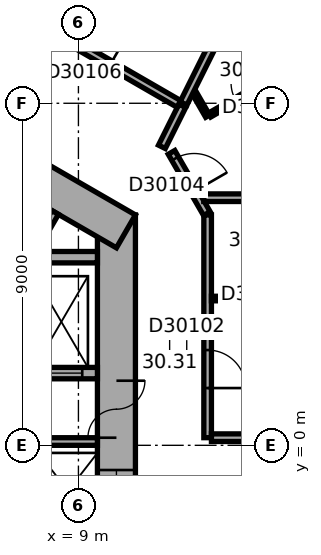
"""IFC4 building model, lengths in metres.
Left out: names, types, materials, properties, quantities, classifications, styles, units other than length and angle.
Written with IfcOpenShell. Run it as: python <this file> out.ifc"""

import sys

from ifc_helpers import new_model, si_unit, direction, frame, frame_2d, origin, place, context, subcontext, project, spatial, rectangle, extrude, element, fill, save


model = new_model("IFC4")
c1 = context("Model", 3, precision=1e-05, world=origin(), true_north=direction((0.0, 1.0)))
c2 = subcontext(c1, "Body", "Model", "MODEL_VIEW")
j1 = project(units=[si_unit("LENGTHUNIT", "METRE"), si_unit("PLANEANGLEUNIT", "RADIAN")], contexts=[c1])
p1 = place(None, origin())
s1 = spatial("IfcSite", under=j1, at=p1, CompositionType="ELEMENT")
p2 = place(p1, origin())
s2 = spatial("IfcBuilding", under=s1, at=p2, CompositionType="ELEMENT")
p3 = place(p2, frame((0.0, 0.0, 124.4)))
s3 = spatial("IfcBuildingStorey", under=s2, at=p3, CompositionType="ELEMENT", Elevation=124.4)
p4 = place(p3, frame((10.0, -6.062, 0.0), z_axis=(0.0, 0.0, 1.0), x_axis=(0.0, 1.0, 0.0)))
e1 = element("IfcWall", 1, at=p4, inside=s3, PredefinedType="SHEAR", context=c2, shape_type="SweptSolid", body=[
    extrude(rectangle(XDim=12.125, YDim=1.0, at=frame_2d((6.062, 0.0))), origin(), (0.0, 0.0, 1.0), 3.7),
])
p5 = place(p4, frame((6.262, 0.0, 0.0)))
e2 = element("IfcOpeningElement", 2, at=p5, cuts=e1, PredefinedType="OPENING", context=c2, shape_type="SweptSolid", body=[
    extrude(rectangle(XDim=1.5, YDim=2.1, at=frame_2d((0.75, 1.05))), frame((0.0, 0.51, 0.0), z_axis=(0.0, -1.0, 0.0), x_axis=(1.0, 0.0, 0.0)), (0.0, 0.0, 1.0), 1.02),
])
p6 = place(p4, frame((1.712, 0.0, 0.0)))
e3 = element("IfcOpeningElement", 3, at=p6, cuts=e1, PredefinedType="OPENING", context=c2, shape_type="SweptSolid", body=[
    extrude(rectangle(XDim=1.1, YDim=2.1, at=frame_2d((0.55, 1.05))), frame((0.0, 0.51, 0.0), z_axis=(0.0, -1.0, 0.0), x_axis=(1.0, 0.0, 0.0)), (0.0, 0.0, 1.0), 1.02),
])
p7 = place(p4, frame((4.312, 0.0, 0.0)))
e4 = element("IfcOpeningElement", 4, at=p7, cuts=e1, PredefinedType="OPENING", context=c2, shape_type="SweptSolid", body=[
    extrude(rectangle(XDim=1.1, YDim=2.1, at=frame_2d((0.55, 1.05))), frame((0.0, 0.51, 0.0), z_axis=(0.0, -1.0, 0.0), x_axis=(1.0, 0.0, 0.0)), (0.0, 0.0, 1.0), 1.02),
])
p8 = place(p3, frame((10.25, 5.629, 0.0), z_axis=(0.0, 0.0, 1.0), x_axis=(-0.866022616891, 0.50000482701, 0.0)))
e5 = element("IfcWall", 5, at=p8, inside=s3, PredefinedType="SHEAR", context=c2, shape_type="SweptSolid", body=[
    extrude(rectangle(XDim=12.125, YDim=1.0, at=frame_2d((6.062, 0.0))), origin(), (0.0, 0.0, 1.0), 3.7),
])
p9 = place(p8, frame((2.612, 0.0, 0.0)))
e6 = element("IfcOpeningElement", 6, at=p9, cuts=e5, PredefinedType="OPENING", context=c2, shape_type="SweptSolid", body=[
    extrude(rectangle(XDim=1.1, YDim=2.1, at=frame_2d((0.55, 1.05))), frame((0.0, 0.51, 0.0), z_axis=(0.0, -1.0, 0.0), x_axis=(1.0, 0.0, 0.0)), (0.0, 0.0, 1.0), 1.02),
])
p10 = place(p8, frame((5.212, 0.0, 0.0)))
e7 = element("IfcOpeningElement", 7, at=p10, cuts=e5, PredefinedType="OPENING", context=c2, shape_type="SweptSolid", body=[
    extrude(rectangle(XDim=1.1, YDim=2.1, at=frame_2d((0.55, 1.05))), frame((0.0, 0.51, 0.0), z_axis=(0.0, -1.0, 0.0), x_axis=(1.0, 0.0, 0.0)), (0.0, 0.0, 1.0), 1.02),
])
p11 = place(p8, frame((7.812, 0.0, 0.0)))
e8 = element("IfcOpeningElement", 8, at=p11, cuts=e5, PredefinedType="OPENING", context=c2, shape_type="SweptSolid", body=[
    extrude(rectangle(XDim=1.1, YDim=2.1, at=frame_2d((0.55, 1.05))), frame((0.0, 0.51, 0.0), z_axis=(0.0, -1.0, 0.0), x_axis=(1.0, 0.0, 0.0)), (0.0, 0.0, 1.0), 1.02),
])
for number, where, z_axis, x_axis in (
    (9, (7.3, 0.1, 0.0), (0.0, 0.0, 1.0), (1.0, 0.0, 0.0)),
    (10, (7.287, 4.222, 0.0), (0.0, 0.0, 1.0), (0.5, 0.866, 0.0)),
):
    element("IfcWall", number, at=place(p3, frame(where, z_axis=z_axis, x_axis=x_axis)), inside=s3, PredefinedType="PARTITIONING", context=c2, shape_type="SweptSolid", body=[
        extrude(rectangle(XDim=2.2, YDim=0.2, at=frame_2d((1.1, 0.0))), origin(), (0.0, 0.0, 1.0), 3.42),
    ])
p12 = place(p3, frame((7.3, 1.9, 0.0), z_axis=(0.0, 0.0, 1.0), x_axis=(1.0, 0.0, 0.0)))
e11 = element("IfcWall", 11, at=p12, inside=s3, PredefinedType="SHEAR", context=c2, shape_type="SweptSolid", body=[
    extrude(rectangle(XDim=2.2, YDim=0.3, at=frame_2d((1.1, 0.0))), origin(), (0.0, 0.0, 1.0), 3.42),
])
p13 = place(p12, frame((0.7, 0.0, 0.0)))
e12 = element("IfcOpeningElement", 12, at=p13, cuts=e11, PredefinedType="OPENING", context=c2, shape_type="SweptSolid", body=[
    extrude(rectangle(XDim=1.1, YDim=2.1, at=frame_2d((0.55, 1.05))), frame((0.0, 0.16, 0.0), z_axis=(0.0, -1.0, 0.0), x_axis=(1.0, 0.0, 0.0)), (0.0, 0.0, 1.0), 0.32),
])
p14 = place(p3, frame((7.3, 4.95, 0.0), z_axis=(0.0, 0.0, 1.0), x_axis=(1.0, 0.0, 0.0)))
e13 = element("IfcWall", 13, at=p14, inside=s3, PredefinedType="SHEAR", context=c2, shape_type="SweptSolid", body=[
    extrude(rectangle(XDim=2.2, YDim=0.3, at=frame_2d((1.1, 0.0))), origin(), (0.0, 0.0, 1.0), 3.42),
])
p15 = place(p3, frame((11.196, 7.854, 0.0), z_axis=(0.0, 0.0, 1.0), x_axis=(0.446241040303, 0.894912808015, 0.0)))
e14 = element("IfcWall", 14, at=p15, inside=s3, PredefinedType="PARTITIONING", context=c2, shape_type="SweptSolid", body=[
    extrude(rectangle(XDim=1.205, YDim=0.2, at=frame_2d((0.603, 0.0))), origin(), (0.0, 0.0, 1.0), 3.42),
])
p16 = place(p3, frame((11.646, 8.981, 0.0), z_axis=(0.0, 0.0, 1.0), x_axis=(-0.866027142779, 0.499996987961, 0.0)))
e15 = element("IfcWall", 15, at=p16, inside=s3, PredefinedType="PARTITIONING", context=c2, shape_type="SweptSolid", body=[
    extrude(rectangle(XDim=9.597, YDim=0.2, at=frame_2d((4.798, 0.0))), origin(), (0.0, 0.0, 1.0), 3.42),
])
p17 = place(p16, frame((2.086, 0.0, 0.0)))
e16 = element("IfcOpeningElement", 16, at=p17, cuts=e15, PredefinedType="OPENING", context=c2, shape_type="SweptSolid", body=[
    extrude(rectangle(XDim=1.0, YDim=2.1, at=frame_2d((0.5, 1.05))), frame((0.0, 0.11, 0.0), z_axis=(0.0, -1.0, 0.0), x_axis=(1.0, 0.0, 0.0)), (0.0, 0.0, 1.0), 0.22),
])
p18 = place(p16, frame((8.01, 0.0, 0.0)))
e17 = element("IfcOpeningElement", 17, at=p18, cuts=e15, PredefinedType="OPENING", context=c2, shape_type="SweptSolid", body=[
    extrude(rectangle(XDim=1.0, YDim=2.1, at=frame_2d((0.5, 1.05))), frame((0.0, 0.11, 0.0), z_axis=(0.0, -1.0, 0.0), x_axis=(1.0, 0.0, 0.0)), (0.0, 0.0, 1.0), 0.22),
])
p19 = place(p3, frame((12.38, 6.097, 0.0), z_axis=(0.0, 0.0, 1.0), x_axis=(-0.499964847546, 0.866045698112, 0.0)))
e18 = element("IfcWall", 18, at=p19, inside=s3, PredefinedType="PARTITIONING", context=c2, shape_type="SweptSolid", body=[
    extrude(rectangle(XDim=1.86, YDim=0.2, at=frame_2d((0.93, 0.0))), origin(), (0.0, 0.0, 1.0), 3.42),
])
p20 = place(p19, frame((0.672, 0.0, 0.0)))
e19 = element("IfcOpeningElement", 19, at=p20, cuts=e18, PredefinedType="OPENING", context=c2, shape_type="SweptSolid", body=[
    extrude(rectangle(XDim=1.0, YDim=2.1, at=frame_2d((0.5, 1.05))), frame((0.0, 0.11, 0.0), z_axis=(0.0, -1.0, 0.0), x_axis=(1.0, 0.0, 0.0)), (0.0, 0.0, 1.0), 0.22),
])
p21 = place(p3, frame((12.4, 0.201, 0.0), z_axis=(0.0, 0.0, 1.0), x_axis=(0.0, 1.0, 0.0)))
e20 = element("IfcWall", 20, at=p21, inside=s3, PredefinedType="PARTITIONING", context=c2, shape_type="SweptSolid", body=[
    extrude(rectangle(XDim=5.861, YDim=0.2, at=frame_2d((2.931, 0.0))), origin(), (0.0, 0.0, 1.0), 3.42),
])
p22 = place(p21, frame((1.306, 0.0, 0.0)))
e21 = element("IfcOpeningElement", 21, at=p22, cuts=e20, PredefinedType="OPENING", context=c2, shape_type="SweptSolid", body=[
    extrude(rectangle(XDim=1.0, YDim=2.1, at=frame_2d((0.5, 1.05))), frame((0.0, 0.11, 0.0), z_axis=(0.0, -1.0, 0.0), x_axis=(1.0, 0.0, 0.0)), (0.0, 0.0, 1.0), 0.22),
])
p23 = place(p3, frame((12.401, 8.661, 0.0), z_axis=(0.0, 0.0, 1.0), x_axis=(-0.499831418649, 0.866122712398, 0.0)))
e22 = element("IfcWall", 22, at=p23, inside=s3, PredefinedType="PARTITIONING", context=c2, shape_type="SweptSolid", body=[
    extrude(rectangle(XDim=0.711, YDim=0.12, at=frame_2d((0.355, 0.0))), origin(), (0.0, 0.0, 1.0), 3.42),
])
p24 = place(p3, frame((13.501, 0.201, 0.0), z_axis=(0.0, 0.0, 1.0), x_axis=(-1.0, 0.0, 0.0)))
e23 = element("IfcWall", 23, at=p24, inside=s3, PredefinedType="PARTITIONING", context=c2, shape_type="SweptSolid", body=[
    extrude(rectangle(XDim=1.001, YDim=0.2, at=frame_2d((0.5, 0.0))), origin(), (0.0, 0.0, 1.0), 3.42),
])
p25 = place(p3, frame((14.601, 9.931, 0.0), z_axis=(0.0, 0.0, 1.0), x_axis=(-0.866023285932, -0.50000366821, 0.0)))
e24 = element("IfcWall", 24, at=p25, inside=s3, PredefinedType="PARTITIONING", context=c2, shape_type="SweptSolid", body=[
    extrude(rectangle(XDim=2.48, YDim=0.12, at=frame_2d((1.24, 0.0))), origin(), (0.0, 0.0, 1.0), 3.42),
])
p26 = place(p25, frame((0.79, 0.0, 0.0)))
e25 = element("IfcOpeningElement", 25, at=p26, cuts=e24, PredefinedType="OPENING", context=c2, shape_type="SweptSolid", body=[
    extrude(rectangle(XDim=0.9, YDim=2.1, at=frame_2d((0.45, 1.05))), frame((0.0, 0.07, 0.0), z_axis=(0.0, -1.0, 0.0), x_axis=(1.0, 0.0, 0.0)), (0.0, 0.0, 1.0), 0.14),
])
p27 = place(p3, frame((15.0, 3.862, 0.0), z_axis=(0.0, 0.0, 1.0), x_axis=(-1.0, 0.0, 0.0)))
e26 = element("IfcWall", 26, at=p27, inside=s3, PredefinedType="PARTITIONING", context=c2, shape_type="SweptSolid", body=[
    extrude(rectangle(XDim=2.5, YDim=0.12, at=frame_2d((1.25, 0.0))), origin(), (0.0, 0.0, 1.0), 3.42),
])
p28 = place(p27, frame((0.8, 0.0, 0.0)))
e27 = element("IfcOpeningElement", 27, at=p28, cuts=e26, PredefinedType="OPENING", context=c2, shape_type="SweptSolid", body=[
    extrude(rectangle(XDim=0.9, YDim=2.1, at=frame_2d((0.45, 1.05))), frame((0.0, 0.07, 0.0), z_axis=(0.0, -1.0, 0.0), x_axis=(1.0, 0.0, 0.0)), (0.0, 0.0, 1.0), 0.14),
])
p29 = place(p3, frame((15.09, 15.663, 0.0), z_axis=(0.0, 0.0, 1.0), x_axis=(-0.446203977428, -0.89493128816, 0.0)))
e28 = element("IfcWall", 28, at=p29, inside=s3, PredefinedType="PARTITIONING", context=c2, shape_type="SweptSolid", body=[
    extrude(rectangle(XDim=7.45, YDim=0.2, at=frame_2d((3.725, 0.0))), origin(), (0.0, 0.0, 1.0), 3.42),
])
p30 = place(p3, frame((20.75, 6.515, 0.0), z_axis=(0.0, 0.0, 1.0), x_axis=(-1.0, 0.0, 0.0)))
e29 = element("IfcWall", 29, at=p30, inside=s3, PredefinedType="PARTITIONING", context=c2, shape_type="SweptSolid", body=[
    extrude(rectangle(XDim=8.452, YDim=0.2, at=frame_2d((4.226, 0.0))), origin(), (0.0, 0.0, 1.0), 3.42),
])
p31 = place(p5, origin())
e30 = element("IfcDoor", 30, at=p31, inside=s3, OperationType="DOUBLE_DOOR_SINGLE_SWING", PredefinedType="DOOR", context=c2, shape_type="SweptSolid", body=[
    extrude(rectangle(XDim=1.5, YDim=2.1, at=frame_2d((0.75, 1.05))), frame((0.0, 0.025, 0.0), z_axis=(0.0, -1.0, 0.0), x_axis=(1.0, 0.0, 0.0)), (0.0, 0.0, 1.0), 0.05),
])
fill(e2, e30)
p32 = place(p13, origin())
e31 = element("IfcDoor", 31, at=p32, inside=s3, OperationType="DOUBLE_DOOR_SLIDING", PredefinedType="DOOR", context=c2, shape_type="SweptSolid", body=[
    extrude(rectangle(XDim=1.1, YDim=2.1, at=frame_2d((0.55, 1.05))), frame((0.0, 0.025, 0.0), z_axis=(0.0, -1.0, 0.0), x_axis=(1.0, 0.0, 0.0)), (0.0, 0.0, 1.0), 0.05),
])
fill(e12, e31)
p33 = place(p7, origin())
e32 = element("IfcDoor", 32, at=p33, inside=s3, OperationType="DOUBLE_DOOR_SLIDING", PredefinedType="DOOR", context=c2, shape_type="SweptSolid", body=[
    extrude(rectangle(XDim=1.1, YDim=2.1, at=frame_2d((0.55, 1.05))), frame((0.0, 0.025, 0.0), z_axis=(0.0, -1.0, 0.0), x_axis=(1.0, 0.0, 0.0)), (0.0, 0.0, 1.0), 0.05),
])
fill(e4, e32)
p34 = place(p22, origin())
e33 = element("IfcDoor", 33, at=p34, inside=s3, OperationType="SINGLE_SWING_LEFT", PredefinedType="DOOR", context=c2, shape_type="SweptSolid", body=[
    extrude(rectangle(XDim=1.0, YDim=2.1, at=frame_2d((0.5, 1.05))), frame((0.0, 0.025, 0.0), z_axis=(0.0, -1.0, 0.0), x_axis=(1.0, 0.0, 0.0)), (0.0, 0.0, 1.0), 0.05),
])
fill(e21, e33)
p35 = place(p20, origin())
e34 = element("IfcDoor", 34, at=p35, inside=s3, OperationType="SINGLE_SWING_LEFT", PredefinedType="DOOR", context=c2, shape_type="SweptSolid", body=[
    extrude(rectangle(XDim=1.0, YDim=2.1, at=frame_2d((0.5, 1.05))), frame((0.0, 0.025, 0.0), z_axis=(0.0, -1.0, 0.0), x_axis=(1.0, 0.0, 0.0)), (0.0, 0.0, 1.0), 0.05),
])
fill(e19, e34)
p36 = place(p26, origin())
e35 = element("IfcDoor", 35, at=p36, inside=s3, OperationType="SINGLE_SWING_LEFT", PredefinedType="DOOR", context=c2, shape_type="SweptSolid", body=[
    extrude(rectangle(XDim=0.9, YDim=2.1, at=frame_2d((0.45, 1.05))), frame((0.0, 0.025, 0.0), z_axis=(0.0, -1.0, 0.0), x_axis=(1.0, 0.0, 0.0)), (0.0, 0.0, 1.0), 0.05),
])
fill(e25, e35)
p37 = place(p17, origin())
e36 = element("IfcDoor", 36, at=p37, inside=s3, OperationType="SINGLE_SWING_LEFT", PredefinedType="DOOR", context=c2, shape_type="SweptSolid", body=[
    extrude(rectangle(XDim=1.0, YDim=2.1, at=frame_2d((0.5, 1.05))), frame((0.0, 0.025, 0.0), z_axis=(0.0, -1.0, 0.0), x_axis=(1.0, 0.0, 0.0)), (0.0, 0.0, 1.0), 0.05),
])
fill(e16, e36)
save(model, sys.argv[1])
